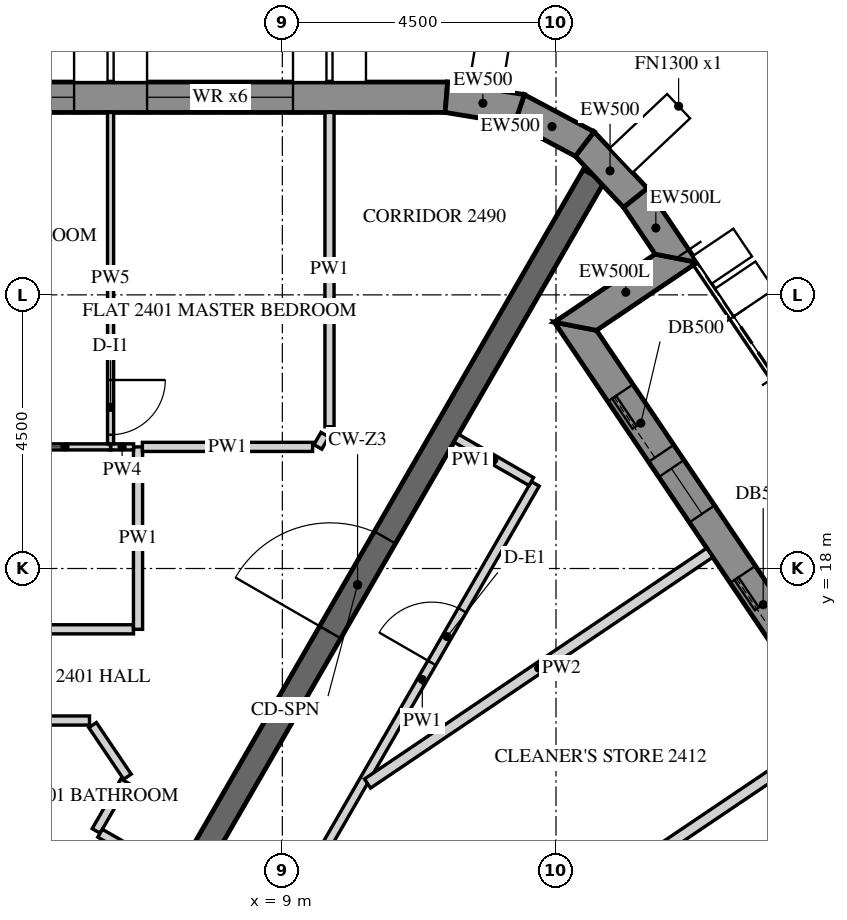
"""IFC4 building model, lengths in metres.
Left out: names, types, materials, properties, quantities, classifications, styles, units other than length and angle.
Written with IfcOpenShell. Run it as: python <this file> out.ifc"""

import sys

from ifc_helpers import new_model, si_unit, direction, frame, frame_2d, origin, place, context, subcontext, project, spatial, polyline, rectangle, outline, extrude, element, fill, save


model = new_model("IFC4")
c1 = context("Model", 3, precision=1e-05, world=origin(), true_north=direction((0.0, 1.0)))
c2 = subcontext(c1, "Body", "Model", "MODEL_VIEW")
j1 = project(units=[si_unit("LENGTHUNIT", "METRE"), si_unit("PLANEANGLEUNIT", "RADIAN")], contexts=[c1])
p1 = place(None, origin())
s1 = spatial("IfcSite", under=j1, at=p1, CompositionType="ELEMENT")
p2 = place(p1, origin())
s2 = spatial("IfcBuilding", under=s1, at=p2, CompositionType="ELEMENT")
p3 = place(p2, frame((0.0, 0.0, 303.0)))
s3 = spatial("IfcBuildingStorey", under=s2, at=p3, CompositionType="ELEMENT", Elevation=303.0)
p4 = place(p3, frame((11.698, 25.75, -0.15), z_axis=(0.0, 0.0, 1.0), x_axis=(-1.0, 0.0, 0.0)))
e1 = element("IfcWall", 1, at=p4, inside=s3, PredefinedType="SOLIDWALL", context=c2, shape_type="SweptSolid", body=[
    extrude(outline(polyline([(-0.021, -0.25), (25.468, -0.25), (25.421, 0.25), (0.021, 0.25), (-0.021, -0.25)])), origin(), (0.0, 0.0, 1.0), 3.9),
])
p5 = place(p4, frame((2.522, 0.0, 0.75)))
e2 = element("IfcOpeningElement", 2, at=p5, cuts=e1, PredefinedType="OPENING", context=c2, shape_type="SweptSolid", body=[
    extrude(rectangle(XDim=2.4, YDim=2.7, at=frame_2d((1.2, 1.35))), frame((0.0, 0.26, 0.0), z_axis=(0.0, -1.0, 0.0), x_axis=(1.0, 0.0, 0.0)), (0.0, 0.0, 1.0), 0.52),
])
p6 = place(p4, frame((6.122, 0.0, 0.75)))
e3 = element("IfcOpeningElement", 3, at=p6, cuts=e1, PredefinedType="OPENING", context=c2, shape_type="SweptSolid", body=[
    extrude(rectangle(XDim=2.4, YDim=2.7, at=frame_2d((1.2, 1.35))), frame((0.0, 0.26, 0.0), z_axis=(0.0, -1.0, 0.0), x_axis=(1.0, 0.0, 0.0)), (0.0, 0.0, 1.0), 0.52),
])
p7 = place(p4, frame((9.722, 0.0, 0.75)))
e4 = element("IfcOpeningElement", 4, at=p7, cuts=e1, PredefinedType="OPENING", context=c2, shape_type="SweptSolid", body=[
    extrude(rectangle(XDim=2.4, YDim=2.7, at=frame_2d((1.2, 1.35))), frame((0.0, 0.26, 0.0), z_axis=(0.0, -1.0, 0.0), x_axis=(1.0, 0.0, 0.0)), (0.0, 0.0, 1.0), 0.52),
])
p8 = place(p4, frame((13.323, 0.0, 0.75)))
e5 = element("IfcOpeningElement", 5, at=p8, cuts=e1, PredefinedType="OPENING", context=c2, shape_type="SweptSolid", body=[
    extrude(rectangle(XDim=2.4, YDim=2.7, at=frame_2d((1.2, 1.35))), frame((0.0, 0.26, 0.0), z_axis=(0.0, -1.0, 0.0), x_axis=(1.0, 0.0, 0.0)), (0.0, 0.0, 1.0), 0.52),
])
p9 = place(p4, frame((16.922, 0.0, 0.75)))
e6 = element("IfcOpeningElement", 6, at=p9, cuts=e1, PredefinedType="OPENING", context=c2, shape_type="SweptSolid", body=[
    extrude(rectangle(XDim=2.4, YDim=2.7, at=frame_2d((1.2, 1.35))), frame((0.0, 0.26, 0.0), z_axis=(0.0, -1.0, 0.0), x_axis=(1.0, 0.0, 0.0)), (0.0, 0.0, 1.0), 0.52),
])
p10 = place(p4, frame((20.522, 0.0, 0.75)))
e7 = element("IfcOpeningElement", 7, at=p10, cuts=e1, PredefinedType="OPENING", context=c2, shape_type="SweptSolid", body=[
    extrude(rectangle(XDim=2.4, YDim=2.7, at=frame_2d((1.2, 1.35))), frame((0.0, 0.26, 0.0), z_axis=(0.0, -1.0, 0.0), x_axis=(1.0, 0.0, 0.0)), (0.0, 0.0, 1.0), 0.52),
])
p11 = place(p3, frame((26.706, 2.879, -0.15), z_axis=(0.0, 0.0, 1.0), x_axis=(-0.559197891507, 0.829034208061, 0.0)))
e8 = element("IfcWall", 8, at=p11, inside=s3, PredefinedType="SOLIDWALL", context=c2, shape_type="SweptSolid", body=[
    extrude(outline(polyline([(0.25, -0.25), (22.795, -0.25), (23.295, 0.25), (-0.25, 0.25), (0.25, -0.25)])), origin(), (0.0, 0.0, 1.0), 3.9),
])
p12 = place(p11, frame((1.323, 0.0, 1.05)))
e9 = element("IfcOpeningElement", 9, at=p12, cuts=e8, PredefinedType="OPENING", context=c2, shape_type="SweptSolid", body=[
    extrude(rectangle(XDim=0.9, YDim=1.5, at=frame_2d((0.45, 0.75))), frame((0.0, 0.26, 0.0), z_axis=(0.0, -1.0, 0.0), x_axis=(1.0, 0.0, 0.0)), (0.0, 0.0, 1.0), 0.52),
])
p13 = place(p11, frame((2.522, 0.0, 0.15)))
e10 = element("IfcOpeningElement", 10, at=p13, cuts=e8, PredefinedType="OPENING", context=c2, shape_type="SweptSolid", body=[
    extrude(rectangle(XDim=1.2, YDim=2.4, at=frame_2d((0.6, 1.2))), frame((0.0, 0.26, 0.0), z_axis=(0.0, -1.0, 0.0), x_axis=(1.0, 0.0, 0.0)), (0.0, 0.0, 1.0), 0.52),
])
p14 = place(p11, frame((4.922, 0.0, 1.05)))
e11 = element("IfcOpeningElement", 11, at=p14, cuts=e8, PredefinedType="OPENING", context=c2, shape_type="SweptSolid", body=[
    extrude(rectangle(XDim=0.9, YDim=1.5, at=frame_2d((0.45, 0.75))), frame((0.0, 0.26, 0.0), z_axis=(0.0, -1.0, 0.0), x_axis=(1.0, 0.0, 0.0)), (0.0, 0.0, 1.0), 0.52),
])
p15 = place(p11, frame((6.122, 0.0, 0.15)))
e12 = element("IfcOpeningElement", 12, at=p15, cuts=e8, PredefinedType="OPENING", context=c2, shape_type="SweptSolid", body=[
    extrude(rectangle(XDim=1.2, YDim=2.4, at=frame_2d((0.6, 1.2))), frame((0.0, 0.26, 0.0), z_axis=(0.0, -1.0, 0.0), x_axis=(1.0, 0.0, 0.0)), (0.0, 0.0, 1.0), 0.52),
])
p16 = place(p11, frame((8.522, 0.0, 1.05)))
e13 = element("IfcOpeningElement", 13, at=p16, cuts=e8, PredefinedType="OPENING", context=c2, shape_type="SweptSolid", body=[
    extrude(rectangle(XDim=0.9, YDim=1.5, at=frame_2d((0.45, 0.75))), frame((0.0, 0.26, 0.0), z_axis=(0.0, -1.0, 0.0), x_axis=(1.0, 0.0, 0.0)), (0.0, 0.0, 1.0), 0.52),
])
p17 = place(p11, frame((9.722, 0.0, 0.15)))
e14 = element("IfcOpeningElement", 14, at=p17, cuts=e8, PredefinedType="OPENING", context=c2, shape_type="SweptSolid", body=[
    extrude(rectangle(XDim=1.2, YDim=2.4, at=frame_2d((0.6, 1.2))), frame((0.0, 0.26, 0.0), z_axis=(0.0, -1.0, 0.0), x_axis=(1.0, 0.0, 0.0)), (0.0, 0.0, 1.0), 0.52),
])
p18 = place(p11, frame((12.122, 0.0, 1.05)))
e15 = element("IfcOpeningElement", 15, at=p18, cuts=e8, PredefinedType="OPENING", context=c2, shape_type="SweptSolid", body=[
    extrude(rectangle(XDim=0.9, YDim=1.5, at=frame_2d((0.45, 0.75))), frame((0.0, 0.26, 0.0), z_axis=(0.0, -1.0, 0.0), x_axis=(1.0, 0.0, 0.0)), (0.0, 0.0, 1.0), 0.52),
])
p19 = place(p11, frame((13.323, 0.0, 0.15)))
e16 = element("IfcOpeningElement", 16, at=p19, cuts=e8, PredefinedType="OPENING", context=c2, shape_type="SweptSolid", body=[
    extrude(rectangle(XDim=1.2, YDim=2.4, at=frame_2d((0.6, 1.2))), frame((0.0, 0.26, 0.0), z_axis=(0.0, -1.0, 0.0), x_axis=(1.0, 0.0, 0.0)), (0.0, 0.0, 1.0), 0.52),
])
p20 = place(p11, frame((15.722, 0.0, 1.05)))
e17 = element("IfcOpeningElement", 17, at=p20, cuts=e8, PredefinedType="OPENING", context=c2, shape_type="SweptSolid", body=[
    extrude(rectangle(XDim=0.9, YDim=1.5, at=frame_2d((0.45, 0.75))), frame((0.0, 0.26, 0.0), z_axis=(0.0, -1.0, 0.0), x_axis=(1.0, 0.0, 0.0)), (0.0, 0.0, 1.0), 0.52),
])
p21 = place(p11, frame((16.922, 0.0, 0.15)))
e18 = element("IfcOpeningElement", 18, at=p21, cuts=e8, PredefinedType="OPENING", context=c2, shape_type="SweptSolid", body=[
    extrude(rectangle(XDim=1.2, YDim=2.4, at=frame_2d((0.6, 1.2))), frame((0.0, 0.26, 0.0), z_axis=(0.0, -1.0, 0.0), x_axis=(1.0, 0.0, 0.0)), (0.0, 0.0, 1.0), 0.52),
])
p22 = place(p11, frame((19.323, 0.0, 1.05)))
e19 = element("IfcOpeningElement", 19, at=p22, cuts=e8, PredefinedType="OPENING", context=c2, shape_type="SweptSolid", body=[
    extrude(rectangle(XDim=0.9, YDim=1.5, at=frame_2d((0.45, 0.75))), frame((0.0, 0.26, 0.0), z_axis=(0.0, -1.0, 0.0), x_axis=(1.0, 0.0, 0.0)), (0.0, 0.0, 1.0), 0.52),
])
p23 = place(p11, frame((20.522, 0.0, 0.15)))
e20 = element("IfcOpeningElement", 20, at=p23, cuts=e8, PredefinedType="OPENING", context=c2, shape_type="SweptSolid", body=[
    extrude(rectangle(XDim=1.2, YDim=2.4, at=frame_2d((0.6, 1.2))), frame((0.0, 0.26, 0.0), z_axis=(0.0, -1.0, 0.0), x_axis=(1.0, 0.0, 0.0)), (0.0, 0.0, 1.0), 0.52),
])
p24 = place(p3, frame((13.819, 21.984, -0.15), z_axis=(0.0, 0.0, 1.0), x_axis=(0.829052389485, 0.559170935841, 0.0)))
e21 = element("IfcWall", 21, at=p24, inside=s3, PredefinedType="SOLIDWALL", context=c2, shape_type="SweptSolid", body=[
    extrude(outline(polyline([(0.25, -0.25), (2.25, -0.25), (1.75, 0.25), (-0.25, 0.25), (0.25, -0.25)])), origin(), (0.0, 0.0, 1.0), 3.9),
])
p25 = place(p3, frame((15.478, 23.102, -0.15), z_axis=(0.0, 0.0, 1.0), x_axis=(-0.559245726333, 0.829001940636, 0.0)))
e22 = element("IfcWall", 22, at=p25, inside=s3, PredefinedType="SOLIDWALL", context=c2, shape_type="SweptSolid", body=[
    extrude(outline(polyline([(-0.25, -0.25), (1.221, -0.25), (1.18, 0.25), (0.25, 0.25), (-0.25, -0.25)])), origin(), (0.0, 0.0, 1.0), 3.9),
])
p26 = place(p3, frame((14.806, 24.097, -0.15), z_axis=(0.0, 0.0, 1.0), x_axis=(-0.686234452793, 0.727380420275, 0.0)))
e23 = element("IfcWall", 23, at=p26, inside=s3, PredefinedType="SOLIDWALL", context=c2, shape_type="SweptSolid", body=[
    extrude(outline(polyline([(-0.021, -0.25), (1.257, -0.25), (1.175, 0.25), (0.021, 0.25), (-0.021, -0.25)])), origin(), (0.0, 0.0, 1.0), 3.9),
])
p27 = place(p3, frame((13.972, 24.982, -0.15), z_axis=(0.0, 0.0, 1.0), x_axis=(-0.882902492938, 0.469556373575, 0.0)))
e24 = element("IfcWall", 24, at=p27, inside=s3, PredefinedType="SOLIDWALL", context=c2, shape_type="SweptSolid", body=[
    extrude(outline(polyline([(-0.041, -0.25), (1.257, -0.25), (1.175, 0.25), (0.041, 0.25), (-0.041, -0.25)])), origin(), (0.0, 0.0, 1.0), 3.9),
])
p28 = place(p3, frame((12.898, 25.553, -0.15), z_axis=(0.0, 0.0, 1.0), x_axis=(-0.986765617372, 0.16215306464, 0.0)))
e25 = element("IfcWall", 25, at=p28, inside=s3, PredefinedType="SOLIDWALL", context=c2, shape_type="SweptSolid", body=[
    extrude(outline(polyline([(-0.041, -0.25), (1.237, -0.25), (1.196, 0.25), (0.041, 0.25), (-0.041, -0.25)])), origin(), (0.0, 0.0, 1.0), 3.9),
])
p29 = place(p3, frame((6.351, 11.0, -0.15), z_axis=(0.0, 0.0, 1.0), x_axis=(0.499998894578, 0.866026041999, 0.0)))
e26 = element("IfcWall", 26, at=p29, inside=s3, PredefinedType="SHEAR", context=c2, shape_type="SweptSolid", body=[
    extrude(rectangle(XDim=15.544, YDim=0.4, at=frame_2d((7.772, 0.0))), origin(), (0.0, 0.0, 1.0), 3.9),
])
p30 = place(p29, frame((6.872, 0.0, 0.15)))
e27 = element("IfcOpeningElement", 27, at=p30, cuts=e26, PredefinedType="OPENING", context=c2, shape_type="SweptSolid", body=[
    extrude(rectangle(XDim=1.8, YDim=2.4, at=frame_2d((0.9, 1.2))), frame((0.0, 0.21, 0.0), z_axis=(0.0, -1.0, 0.0), x_axis=(1.0, 0.0, 0.0)), (0.0, 0.0, 1.0), 0.42),
])
p31 = place(p3, frame((6.552, 17.0, 0.0), z_axis=(0.0, 0.0, 1.0), x_axis=(-1.0, 0.0, 0.0)))
e28 = element("IfcWall", 28, at=p31, inside=s3, PredefinedType="PARTITIONING", context=c2, shape_type="SweptSolid", body=[
    extrude(rectangle(XDim=14.949, YDim=0.15, at=frame_2d((7.475, 0.0))), origin(), (0.0, 0.0, 1.0), 2.988),
])
p32 = place(p31, frame((2.725, 0.0, 0.0)))
e29 = element("IfcOpeningElement", 29, at=p32, cuts=e28, PredefinedType="OPENING", context=c2, shape_type="SweptSolid", body=[
    extrude(rectangle(XDim=1.0, YDim=2.1, at=frame_2d((0.5, 1.05))), frame((0.0, 0.085, 0.0), z_axis=(0.0, -1.0, 0.0), x_axis=(1.0, 0.0, 0.0)), (0.0, 0.0, 1.0), 0.17),
])
p33 = place(p31, frame((13.799, 0.0, 0.0)))
e30 = element("IfcOpeningElement", 30, at=p33, cuts=e28, PredefinedType="OPENING", context=c2, shape_type="SweptSolid", body=[
    extrude(rectangle(XDim=1.0, YDim=2.1, at=frame_2d((0.5, 1.05))), frame((0.0, 0.085, 0.0), z_axis=(0.0, -1.0, 0.0), x_axis=(1.0, 0.0, 0.0)), (0.0, 0.0, 1.0), 0.17),
])
p34 = place(p3, frame((6.627, 20.0, 0.0), z_axis=(0.0, 0.0, 1.0), x_axis=(0.0, -1.0, 0.0)))
e31 = element("IfcWall", 31, at=p34, inside=s3, PredefinedType="PARTITIONING", context=c2, shape_type="SweptSolid", body=[
    extrude(rectangle(XDim=3.0, YDim=0.15, at=frame_2d((1.5, 0.0))), origin(), (0.0, 0.0, 1.0), 2.988),
])
p35 = place(p3, frame((9.775, 25.5, 0.0), z_axis=(0.0, 0.0, 1.0), x_axis=(0.0, -1.0, 0.0)))
e32 = element("IfcWall", 32, at=p35, inside=s3, PredefinedType="PARTITIONING", context=c2, shape_type="SweptSolid", body=[
    extrude(rectangle(XDim=5.169, YDim=0.15, at=frame_2d((2.584, 0.0))), origin(), (0.0, 0.0, 1.0), 2.988),
])
p36 = place(p3, frame((9.7, 20.201, 0.0), z_axis=(0.0, 0.0, 1.0), x_axis=(-0.500207565094, -0.865905532852, 0.0)))
e33 = element("IfcWall", 33, at=p36, inside=s3, PredefinedType="PARTITIONING", context=c2, shape_type="SweptSolid", body=[
    extrude(rectangle(XDim=0.232, YDim=0.15, at=frame_2d((0.116, 0.0))), origin(), (0.0, 0.0, 1.0), 2.988),
])
p37 = place(p3, frame((9.497, 20.0, 0.0), z_axis=(0.0, 0.0, 1.0), x_axis=(-1.0, 0.0, 0.0)))
e34 = element("IfcWall", 34, at=p37, inside=s3, PredefinedType="PARTITIONING", context=c2, shape_type="SweptSolid", body=[
    extrude(rectangle(XDim=2.799, YDim=0.15, at=frame_2d((1.399, 0.0))), origin(), (0.0, 0.0, 1.0), 2.988),
])
p38 = place(p3, frame((-7.377, 15.5, 0.0), z_axis=(0.0, 0.0, 1.0), x_axis=(1.0, 0.0, 0.0)))
e35 = element("IfcWall", 35, at=p38, inside=s3, PredefinedType="PARTITIONING", context=c2, shape_type="SweptSolid", body=[
    extrude(rectangle(XDim=13.206, YDim=0.15, at=frame_2d((6.603, 0.0))), origin(), (0.0, 0.0, 1.0), 2.988),
])
p39 = place(p38, frame((6.153, 0.0, 0.0)))
e36 = element("IfcOpeningElement", 36, at=p39, cuts=e35, PredefinedType="OPENING", context=c2, shape_type="SweptSolid", body=[
    extrude(rectangle(XDim=0.9, YDim=2.1, at=frame_2d((0.45, 1.05))), frame((0.0, 0.085, 0.0), z_axis=(0.0, -1.0, 0.0), x_axis=(1.0, 0.0, 0.0)), (0.0, 0.0, 1.0), 0.17),
])
p40 = place(p3, frame((5.88, 15.425, 0.0), z_axis=(0.0, 0.0, 1.0), x_axis=(0.559202631314, -0.829031010959, 0.0)))
e37 = element("IfcWall", 37, at=p40, inside=s3, PredefinedType="PARTITIONING", context=c2, shape_type="SweptSolid", body=[
    extrude(rectangle(XDim=1.024, YDim=0.15, at=frame_2d((0.512, 0.0))), origin(), (0.0, 0.0, 1.0), 2.988),
])
p41 = place(p3, frame((6.411, 14.504, 0.0), z_axis=(0.0, 0.0, 1.0), x_axis=(-0.499998034377, -0.866026538634, 0.0)))
e38 = element("IfcWall", 38, at=p41, inside=s3, PredefinedType="PARTITIONING", context=c2, shape_type="SweptSolid", body=[
    extrude(rectangle(XDim=0.946, YDim=0.15, at=frame_2d((0.473, 0.0))), origin(), (0.0, 0.0, 1.0), 2.988),
])
p42 = place(p3, frame((6.003, 13.647, 0.0), z_axis=(0.0, 0.0, 1.0), x_axis=(0.865988727248, -0.500063520245, 0.0)))
e39 = element("IfcWall", 39, at=p42, inside=s3, PredefinedType="PARTITIONING", context=c2, shape_type="SweptSolid", body=[
    extrude(rectangle(XDim=1.425, YDim=0.15, at=frame_2d((0.712, 0.0))), origin(), (0.0, 0.0, 1.0), 2.988),
])
p43 = place(p3, frame((9.444, 12.957, 0.0), z_axis=(0.0, 0.0, 1.0), x_axis=(0.500004967958, 0.866022535513, 0.0)))
e40 = element("IfcWall", 40, at=p43, inside=s3, PredefinedType="PARTITIONING", context=c2, shape_type="SweptSolid", body=[
    extrude(rectangle(XDim=7.431, YDim=0.15, at=frame_2d((3.715, 0.0))), origin(), (0.0, 0.0, 1.0), 2.988),
])
p44 = place(p43, frame((4.03, 0.0, 0.0)))
e41 = element("IfcOpeningElement", 41, at=p44, cuts=e40, PredefinedType="OPENING", context=c2, shape_type="SweptSolid", body=[
    extrude(rectangle(XDim=1.0, YDim=2.1, at=frame_2d((0.5, 1.05))), frame((0.0, 0.085, 0.0), z_axis=(0.0, -1.0, 0.0), x_axis=(1.0, 0.0, 0.0)), (0.0, 0.0, 1.0), 0.17),
])
p45 = place(p3, frame((13.094, 19.43, 0.0), z_axis=(0.0, 0.0, 1.0), x_axis=(-0.866062911188, 0.499935029643, 0.0)))
e42 = element("IfcWall", 42, at=p45, inside=s3, PredefinedType="PARTITIONING", context=c2, shape_type="SweptSolid", body=[
    extrude(rectangle(XDim=1.425, YDim=0.15, at=frame_2d((0.712, 0.0))), origin(), (0.0, 0.0, 1.0), 2.988),
])
p46 = place(p3, frame((6.554, 20.0, 0.0), z_axis=(0.0, 0.0, 1.0), x_axis=(-1.0, 0.0, 0.0)))
e43 = element("IfcWall", 43, at=p46, inside=s3, PredefinedType="PARTITIONING", context=c2, shape_type="SweptSolid", body=[
    extrude(rectangle(XDim=0.378, YDim=0.1, at=frame_2d((0.189, 0.0))), origin(), (0.0, 0.0, 1.0), 2.988),
])
p47 = place(p3, frame((6.175, 20.0, 0.0), z_axis=(0.0, 0.0, 1.0), x_axis=(-1.0, 0.0, 0.0)))
e44 = element("IfcWall", 44, at=p47, inside=s3, PredefinedType="PARTITIONING", context=c2, shape_type="SweptSolid", body=[
    extrude(rectangle(XDim=1.501, YDim=0.1, at=frame_2d((0.75, 0.0))), origin(), (0.0, 0.0, 1.0), 2.988),
])
p48 = place(p3, frame((6.175, 25.5, 0.0), z_axis=(0.0, 0.0, 1.0), x_axis=(0.0, -1.0, 0.0)))
e45 = element("IfcWall", 45, at=p48, inside=s3, PredefinedType="PARTITIONING", context=c2, shape_type="SweptSolid", body=[
    extrude(rectangle(XDim=5.45, YDim=0.1, at=frame_2d((2.725, 0.0))), origin(), (0.0, 0.0, 1.0), 2.988),
])
p49 = place(p48, frame((4.4, 0.0, 0.0)))
e46 = element("IfcOpeningElement", 46, at=p49, cuts=e45, PredefinedType="OPENING", context=c2, shape_type="SweptSolid", body=[
    extrude(rectangle(XDim=0.9, YDim=2.1, at=frame_2d((0.45, 1.05))), frame((0.0, 0.06, 0.0), z_axis=(0.0, -1.0, 0.0), x_axis=(1.0, 0.0, 0.0)), (0.0, 0.0, 1.0), 0.12),
])
p50 = place(p3, frame((18.042, 15.276, 0.0), z_axis=(0.0, 0.0, 1.0), x_axis=(-0.829037762759, -0.559192621481, 0.0)))
e47 = element("IfcWall", 47, at=p50, inside=s3, PredefinedType="PARTITIONING", context=c2, shape_type="SweptSolid", body=[
    extrude(rectangle(XDim=8.425, YDim=0.18, at=frame_2d((4.212, 0.0))), origin(), (0.0, 0.0, 1.0), 2.988),
])
p51 = place(p3, frame((16.029, 18.26, 0.0), z_axis=(0.0, 0.0, 1.0), x_axis=(-0.82904538001, -0.559181328268, 0.0)))
e48 = element("IfcWall", 48, at=p51, inside=s3, PredefinedType="PARTITIONING", context=c2, shape_type="SweptSolid", body=[
    extrude(rectangle(XDim=6.79, YDim=0.18, at=frame_2d((3.395, 0.0))), origin(), (0.0, 0.0, 1.0), 2.988),
])
p52 = place(p5, frame((0.0, 0.18, 0.0)))
e49 = element("IfcWindow", 49, at=p52, inside=s3, PartitioningType="DOUBLE_PANEL_VERTICAL", PredefinedType="WINDOW", context=c2, shape_type="SweptSolid", body=[
    extrude(rectangle(XDim=2.4, YDim=2.7, at=frame_2d((1.2, 1.35))), frame((0.0, 0.03, 0.0), z_axis=(0.0, -1.0, 0.0), x_axis=(1.0, 0.0, 0.0)), (0.0, 0.0, 1.0), 0.06),
])
fill(e2, e49)
p53 = place(p6, frame((0.0, 0.18, 0.0)))
e50 = element("IfcWindow", 50, at=p53, inside=s3, PartitioningType="DOUBLE_PANEL_VERTICAL", PredefinedType="WINDOW", context=c2, shape_type="SweptSolid", body=[
    extrude(rectangle(XDim=2.4, YDim=2.7, at=frame_2d((1.2, 1.35))), frame((0.0, 0.03, 0.0), z_axis=(0.0, -1.0, 0.0), x_axis=(1.0, 0.0, 0.0)), (0.0, 0.0, 1.0), 0.06),
])
fill(e3, e50)
p54 = place(p21, frame((0.0, 0.175, 0.0)))
e51 = element("IfcDoor", 51, at=p54, inside=s3, OperationType="SLIDING_TO_LEFT", PredefinedType="DOOR", context=c2, shape_type="SweptSolid", body=[
    extrude(rectangle(XDim=1.2, YDim=2.4, at=frame_2d((0.6, 1.2))), frame((0.0, 0.025, 0.0), z_axis=(0.0, -1.0, 0.0), x_axis=(1.0, 0.0, 0.0)), (0.0, 0.0, 1.0), 0.05),
])
fill(e18, e51)
p55 = place(p22, frame((0.0, 0.18, 0.0)))
e52 = element("IfcWindow", 52, at=p55, inside=s3, PartitioningType="SINGLE_PANEL", PredefinedType="WINDOW", context=c2, shape_type="SweptSolid", body=[
    extrude(rectangle(XDim=0.9, YDim=1.5, at=frame_2d((0.45, 0.75))), frame((0.0, 0.03, 0.0), z_axis=(0.0, -1.0, 0.0), x_axis=(1.0, 0.0, 0.0)), (0.0, 0.0, 1.0), 0.06),
])
fill(e19, e52)
p56 = place(p23, frame((0.0, 0.175, 0.0)))
e53 = element("IfcDoor", 53, at=p56, inside=s3, OperationType="SLIDING_TO_LEFT", PredefinedType="DOOR", context=c2, shape_type="SweptSolid", body=[
    extrude(rectangle(XDim=1.2, YDim=2.4, at=frame_2d((0.6, 1.2))), frame((0.0, 0.025, 0.0), z_axis=(0.0, -1.0, 0.0), x_axis=(1.0, 0.0, 0.0)), (0.0, 0.0, 1.0), 0.05),
])
fill(e20, e53)
p57 = place(p30, origin())
e54 = element("IfcDoor", 54, at=p57, inside=s3, OperationType="DOUBLE_DOOR_SINGLE_SWING", PredefinedType="DOOR", context=c2, shape_type="SweptSolid", body=[
    extrude(rectangle(XDim=1.8, YDim=2.4, at=frame_2d((0.9, 1.2))), frame((0.0, 0.025, 0.0), z_axis=(0.0, -1.0, 0.0), x_axis=(1.0, 0.0, 0.0)), (0.0, 0.0, 1.0), 0.05),
])
fill(e27, e54)
p58 = place(p49, origin())
e55 = element("IfcDoor", 55, at=p58, inside=s3, OperationType="SINGLE_SWING_RIGHT", PredefinedType="DOOR", context=c2, shape_type="SweptSolid", body=[
    extrude(rectangle(XDim=0.9, YDim=2.1, at=frame_2d((0.45, 1.05))), frame((0.0, 0.025, 0.0), z_axis=(0.0, -1.0, 0.0), x_axis=(1.0, 0.0, 0.0)), (0.0, 0.0, 1.0), 0.05),
])
fill(e46, e55)
p59 = place(p44, origin())
e56 = element("IfcDoor", 56, at=p59, inside=s3, OperationType="SINGLE_SWING_RIGHT", PredefinedType="DOOR", context=c2, shape_type="SweptSolid", body=[
    extrude(rectangle(XDim=1.0, YDim=2.1, at=frame_2d((0.5, 1.05))), frame((0.0, 0.025, 0.0), z_axis=(0.0, -1.0, 0.0), x_axis=(1.0, 0.0, 0.0)), (0.0, 0.0, 1.0), 0.05),
])
fill(e41, e56)
save(model, sys.argv[1])
